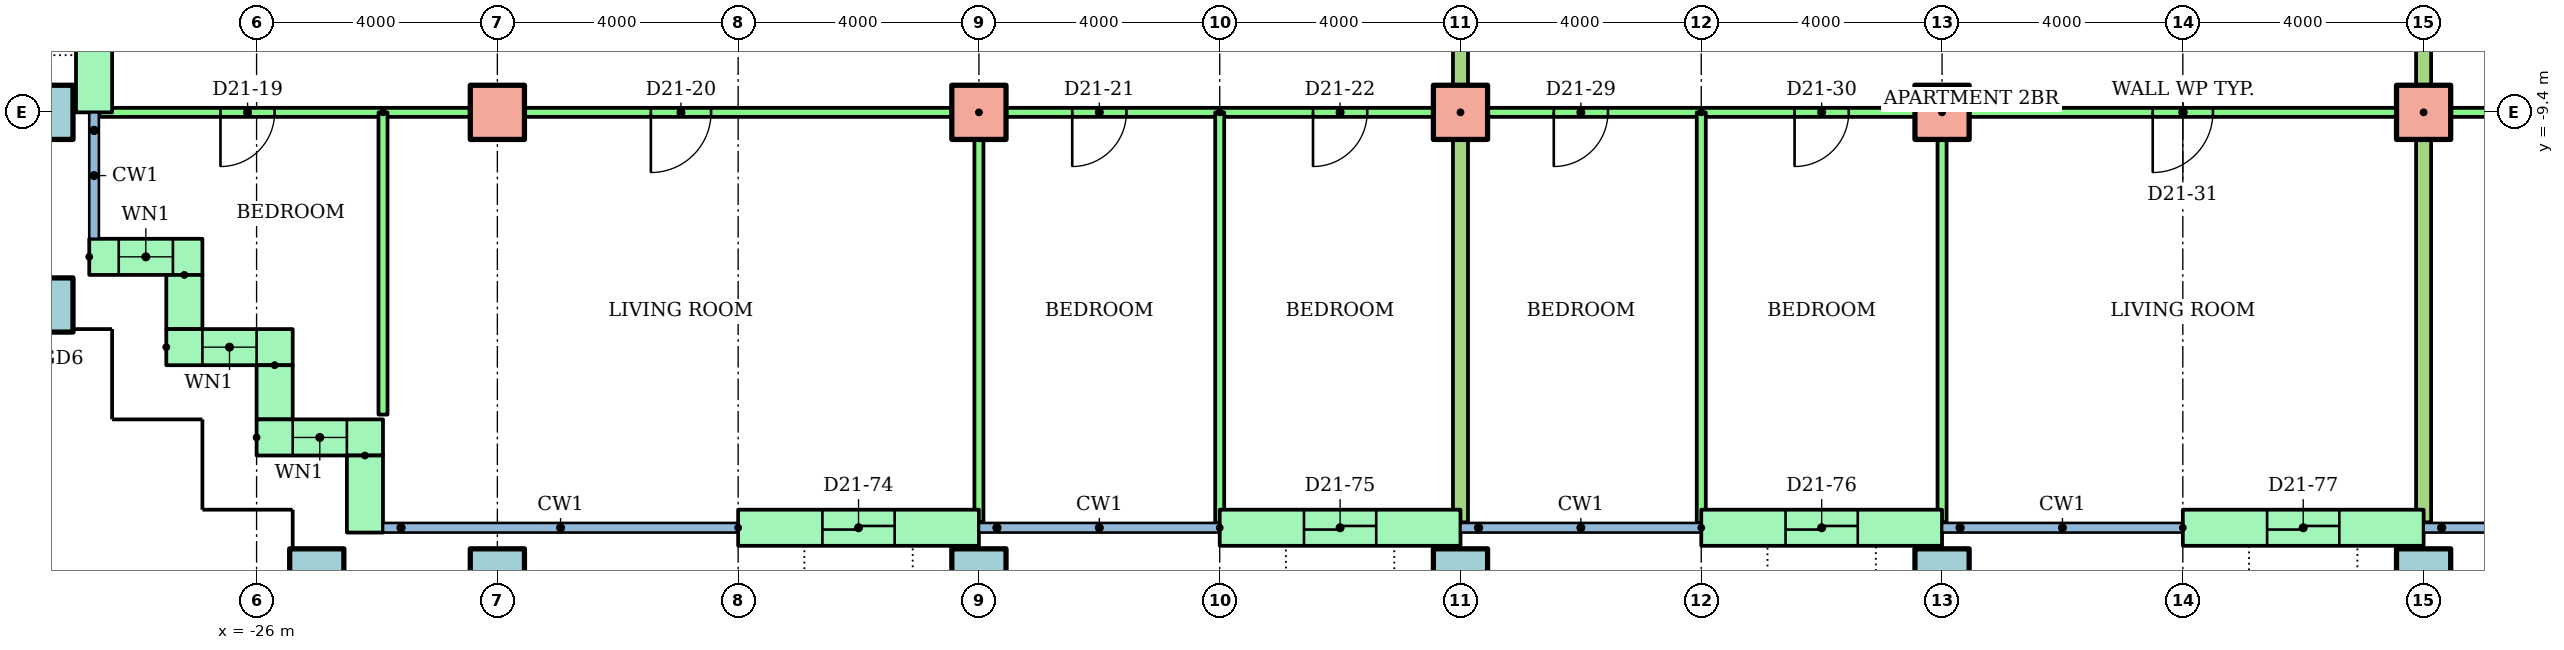
"""IFC4 building model, lengths in metres.
Left out: names, types, materials, properties, quantities, classifications, styles, units other than length and angle.
Written with IfcOpenShell. Run it as: python <this file> out.ifc"""

import sys

from ifc_helpers import new_model, si_unit, direction, frame, frame_2d, origin, origin_2d, place, context, subcontext, project, spatial, rectangle, hollow_rectangle, extrude, element, fill, save


model = new_model("IFC4")
c1 = context("Model", 3, precision=1e-05, world=origin(), true_north=direction((0.0, 1.0)))
c2 = subcontext(c1, "Body", "Model", "MODEL_VIEW")
j1 = project(units=[si_unit("LENGTHUNIT", "METRE"), si_unit("PLANEANGLEUNIT", "RADIAN")], contexts=[c1])
p1 = place(None, origin())
s1 = spatial("IfcSite", under=j1, at=p1, CompositionType="ELEMENT")
p2 = place(p1, origin())
s2 = spatial("IfcBuilding", under=s1, at=p2, CompositionType="ELEMENT")
p3 = place(p2, frame((0.0, 0.0, 83.9)))
s3 = spatial("IfcBuildingStorey", under=s2, at=p3, CompositionType="ELEMENT", Elevation=83.9)
for number, where in (
    (1, (-25.0, -17.1, 0.0)),
    (2, (-22.0, -17.1, 0.0)),
    (3, (-14.0, -17.1, 0.0)),
    (4, (-6.0, -17.1, 0.0)),
    (5, (2.0, -17.1, 0.0)),
    (6, (10.0, -17.1, 0.0)),
    (7, (-29.5, -12.6, 0.0)),
    (8, (-29.5, -9.4, 0.0)),
):
    element("IfcColumn", number, at=place(p3, frame(where)), inside=s3, PredefinedType="COLUMN", context=c2, shape_type="SweptSolid", body=[
        extrude(hollow_rectangle(XDim=0.9, YDim=0.9, WallThickness=0.045, at=origin_2d()), origin(), (0.0, 0.0, 1.0), 3.2),
    ])
for number, where in (
    (9, (-22.0, -9.4, 0.0)),
    (10, (-14.0, -9.4, 0.0)),
    (11, (-6.0, -9.4, 0.0)),
    (12, (2.0, -9.4, 0.0)),
    (13, (10.0, -9.4, 0.0)),
):
    element("IfcColumn", number, at=place(p3, frame(where)), inside=s3, PredefinedType="COLUMN", context=c2, shape_type="SweptSolid", body=[
        extrude(rectangle(XDim=0.9, YDim=0.9, at=origin_2d()), origin(), (0.0, 0.0, 1.0), 3.2),
    ])
p4 = place(p3, frame((-28.7, -5.7, 0.0), z_axis=(0.0, 0.0, 1.0), x_axis=(0.0, -1.0, 0.0)))
e14 = element("IfcWall", 14, at=p4, inside=s3, PredefinedType="STANDARD", context=c2, shape_type="SweptSolid", body=[
    extrude(rectangle(XDim=3.7, YDim=0.6, at=frame_2d((1.85, 0.0))), origin(), (0.0, 0.0, 1.0), 2.92),
])
p5 = place(p4, frame((0.825, 0.0, 0.0)))
e15 = element("IfcOpeningElement", 15, at=p5, cuts=e14, PredefinedType="OPENING", context=c2, shape_type="SweptSolid", body=[
    extrude(rectangle(XDim=1.2, YDim=2.1, at=frame_2d((0.6, 1.05))), frame((0.0, 0.31, 0.0), z_axis=(0.0, -1.0, 0.0), x_axis=(1.0, 0.0, 0.0)), (0.0, 0.0, 1.0), 0.62),
])
p6 = place(p3, frame((-28.78, -11.8, 0.0)))
e16 = element("IfcWall", 16, at=p6, inside=s3, PredefinedType="STANDARD", context=c2, shape_type="SweptSolid", body=[
    extrude(rectangle(XDim=1.88, YDim=0.6, at=frame_2d((0.94, 0.0))), origin(), (0.0, 0.0, 1.0), 2.92),
])
p7 = place(p6, frame((0.49, 0.0, 0.9)))
e17 = element("IfcOpeningElement", 17, at=p7, cuts=e16, PredefinedType="OPENING", context=c2, shape_type="SweptSolid", body=[
    extrude(rectangle(XDim=0.9, YDim=1.5, at=frame_2d((0.45, 0.75))), frame((0.0, 0.31, 0.0), z_axis=(0.0, -1.0, 0.0), x_axis=(1.0, 0.0, 0.0)), (0.0, 0.0, 1.0), 0.62),
])
p8 = place(p3, frame((-27.2, -12.1, 0.0), z_axis=(0.0, 0.0, 1.0), x_axis=(0.0, -1.0, 0.0)))
e18 = element("IfcWall", 18, at=p8, inside=s3, PredefinedType="STANDARD", context=c2, shape_type="SweptSolid", body=[
    extrude(rectangle(XDim=0.9, YDim=0.6, at=frame_2d((0.45, 0.0))), origin(), (0.0, 0.0, 1.0), 2.92),
])
p9 = place(p3, frame((-27.5, -13.3, 0.0)))
e19 = element("IfcWall", 19, at=p9, inside=s3, PredefinedType="STANDARD", context=c2, shape_type="SweptSolid", body=[
    extrude(rectangle(XDim=2.1, YDim=0.6, at=frame_2d((1.05, 0.0))), origin(), (0.0, 0.0, 1.0), 2.92),
])
p10 = place(p9, frame((0.6, 0.0, 0.9)))
e20 = element("IfcOpeningElement", 20, at=p10, cuts=e19, PredefinedType="OPENING", context=c2, shape_type="SweptSolid", body=[
    extrude(rectangle(XDim=0.9, YDim=1.5, at=frame_2d((0.45, 0.75))), frame((0.0, 0.31, 0.0), z_axis=(0.0, -1.0, 0.0), x_axis=(1.0, 0.0, 0.0)), (0.0, 0.0, 1.0), 0.62),
])
p11 = place(p3, frame((-25.7, -13.6, 0.0), z_axis=(0.0, 0.0, 1.0), x_axis=(0.0, -1.0, 0.0)))
e21 = element("IfcWall", 21, at=p11, inside=s3, PredefinedType="STANDARD", context=c2, shape_type="SweptSolid", body=[
    extrude(rectangle(XDim=0.9, YDim=0.6, at=frame_2d((0.45, 0.0))), origin(), (0.0, 0.0, 1.0), 2.92),
])
p12 = place(p3, frame((-26.0, -14.8, 0.0)))
e22 = element("IfcWall", 22, at=p12, inside=s3, PredefinedType="STANDARD", context=c2, shape_type="SweptSolid", body=[
    extrude(rectangle(XDim=2.1, YDim=0.6, at=frame_2d((1.05, 0.0))), origin(), (0.0, 0.0, 1.0), 2.92),
])
p13 = place(p12, frame((0.6, 0.0, 0.9)))
e23 = element("IfcOpeningElement", 23, at=p13, cuts=e22, PredefinedType="OPENING", context=c2, shape_type="SweptSolid", body=[
    extrude(rectangle(XDim=0.9, YDim=1.5, at=frame_2d((0.45, 0.75))), frame((0.0, 0.31, 0.0), z_axis=(0.0, -1.0, 0.0), x_axis=(1.0, 0.0, 0.0)), (0.0, 0.0, 1.0), 0.62),
])
p14 = place(p3, frame((-24.2, -15.1, 0.0), z_axis=(0.0, 0.0, 1.0), x_axis=(0.0, -1.0, 0.0)))
e24 = element("IfcWall", 24, at=p14, inside=s3, PredefinedType="STANDARD", context=c2, shape_type="SweptSolid", body=[
    extrude(rectangle(XDim=1.28, YDim=0.6, at=frame_2d((0.64, 0.0))), origin(), (0.0, 0.0, 1.0), 2.92),
])
p15 = place(p3, frame((-18.0, -16.3, 0.0)))
e25 = element("IfcWall", 25, at=p15, inside=s3, PredefinedType="STANDARD", context=c2, shape_type="SweptSolid", body=[
    extrude(rectangle(XDim=4.0, YDim=0.6, at=frame_2d((2.0, 0.0))), origin(), (0.0, 0.0, 1.0), 2.92),
])
p16 = place(p15, frame((1.4, 0.0, 0.0)))
e26 = element("IfcOpeningElement", 26, at=p16, cuts=e25, PredefinedType="OPENING", context=c2, shape_type="SweptSolid", body=[
    extrude(rectangle(XDim=1.2, YDim=2.1, at=frame_2d((0.6, 1.05))), frame((0.0, 0.31, 0.0), z_axis=(0.0, -1.0, 0.0), x_axis=(1.0, 0.0, 0.0)), (0.0, 0.0, 1.0), 0.62),
])
p17 = place(p3, frame((-10.0, -16.3, 0.0)))
e27 = element("IfcWall", 27, at=p17, inside=s3, PredefinedType="STANDARD", context=c2, shape_type="SweptSolid", body=[
    extrude(rectangle(XDim=4.0, YDim=0.6, at=frame_2d((2.0, 0.0))), origin(), (0.0, 0.0, 1.0), 2.92),
])
p18 = place(p17, frame((1.4, 0.0, 0.0)))
e28 = element("IfcOpeningElement", 28, at=p18, cuts=e27, PredefinedType="OPENING", context=c2, shape_type="SweptSolid", body=[
    extrude(rectangle(XDim=1.2, YDim=2.1, at=frame_2d((0.6, 1.05))), frame((0.0, 0.31, 0.0), z_axis=(0.0, -1.0, 0.0), x_axis=(1.0, 0.0, 0.0)), (0.0, 0.0, 1.0), 0.62),
])
p19 = place(p3, frame((-2.0, -16.3, 0.0)))
e29 = element("IfcWall", 29, at=p19, inside=s3, PredefinedType="STANDARD", context=c2, shape_type="SweptSolid", body=[
    extrude(rectangle(XDim=4.0, YDim=0.6, at=frame_2d((2.0, 0.0))), origin(), (0.0, 0.0, 1.0), 2.92),
])
p20 = place(p19, frame((1.4, 0.0, 0.0)))
e30 = element("IfcOpeningElement", 30, at=p20, cuts=e29, PredefinedType="OPENING", context=c2, shape_type="SweptSolid", body=[
    extrude(rectangle(XDim=1.2, YDim=2.1, at=frame_2d((0.6, 1.05))), frame((0.0, 0.31, 0.0), z_axis=(0.0, -1.0, 0.0), x_axis=(1.0, 0.0, 0.0)), (0.0, 0.0, 1.0), 0.62),
])
p21 = place(p3, frame((6.0, -16.3, 0.0)))
e31 = element("IfcWall", 31, at=p21, inside=s3, PredefinedType="STANDARD", context=c2, shape_type="SweptSolid", body=[
    extrude(rectangle(XDim=4.0, YDim=0.6, at=frame_2d((2.0, 0.0))), origin(), (0.0, 0.0, 1.0), 2.92),
])
p22 = place(p21, frame((1.4, 0.0, 0.0)))
e32 = element("IfcOpeningElement", 32, at=p22, cuts=e31, PredefinedType="OPENING", context=c2, shape_type="SweptSolid", body=[
    extrude(rectangle(XDim=1.2, YDim=2.1, at=frame_2d((0.6, 1.05))), frame((0.0, 0.31, 0.0), z_axis=(0.0, -1.0, 0.0), x_axis=(1.0, 0.0, 0.0)), (0.0, 0.0, 1.0), 0.62),
])
p23 = place(p3, frame((-6.0, -9.4, 0.0), z_axis=(0.0, 0.0, 1.0), x_axis=(-1.0, 0.0, 0.0)))
e33 = element("IfcWall", 33, at=p23, inside=s3, PredefinedType="PARTITIONING", context=c2, shape_type="SweptSolid", body=[
    extrude(rectangle(XDim=22.61, YDim=0.15, at=frame_2d((11.305, 0.0))), origin(), (0.0, 0.0, 1.0), 2.4),
])
p24 = place(p23, frame((19.7, 0.0, 0.0)))
e34 = element("IfcOpeningElement", 34, at=p24, cuts=e33, PredefinedType="OPENING", context=c2, shape_type="SweptSolid", body=[
    extrude(rectangle(XDim=0.9, YDim=2.1, at=frame_2d((0.45, 1.05))), frame((0.0, 0.085, 0.0), z_axis=(0.0, -1.0, 0.0), x_axis=(1.0, 0.0, 0.0)), (0.0, 0.0, 1.0), 0.17),
])
p25 = place(p23, frame((12.45, 0.0, 0.0)))
e35 = element("IfcOpeningElement", 35, at=p25, cuts=e33, PredefinedType="OPENING", context=c2, shape_type="SweptSolid", body=[
    extrude(rectangle(XDim=1.0, YDim=2.1, at=frame_2d((0.5, 1.05))), frame((0.0, 0.085, 0.0), z_axis=(0.0, -1.0, 0.0), x_axis=(1.0, 0.0, 0.0)), (0.0, 0.0, 1.0), 0.17),
])
p26 = place(p23, frame((5.55, 0.0, 0.0)))
e36 = element("IfcOpeningElement", 36, at=p26, cuts=e33, PredefinedType="OPENING", context=c2, shape_type="SweptSolid", body=[
    extrude(rectangle(XDim=0.9, YDim=2.1, at=frame_2d((0.45, 1.05))), frame((0.0, 0.085, 0.0), z_axis=(0.0, -1.0, 0.0), x_axis=(1.0, 0.0, 0.0)), (0.0, 0.0, 1.0), 0.17),
])
p27 = place(p23, frame((1.55, 0.0, 0.0)))
e37 = element("IfcOpeningElement", 37, at=p27, cuts=e33, PredefinedType="OPENING", context=c2, shape_type="SweptSolid", body=[
    extrude(rectangle(XDim=0.9, YDim=2.1, at=frame_2d((0.45, 1.05))), frame((0.0, 0.085, 0.0), z_axis=(0.0, -1.0, 0.0), x_axis=(1.0, 0.0, 0.0)), (0.0, 0.0, 1.0), 0.17),
])
p28 = place(p3, frame((-23.9, -9.4, 0.0), z_axis=(0.0, 0.0, 1.0), x_axis=(0.0, -1.0, 0.0)))
e38 = element("IfcWall", 38, at=p28, inside=s3, PredefinedType="PARTITIONING", context=c2, shape_type="SweptSolid", body=[
    extrude(rectangle(XDim=5.02, YDim=0.15, at=frame_2d((2.51, 0.0))), origin(), (0.0, 0.0, 1.0), 2.4),
])
p29 = place(p3, frame((-14.0, -9.4, 0.0), z_axis=(0.0, 0.0, 1.0), x_axis=(0.0, -1.0, 0.0)))
e39 = element("IfcWall", 39, at=p29, inside=s3, PredefinedType="PARTITIONING", context=c2, shape_type="SweptSolid", body=[
    extrude(rectangle(XDim=6.81, YDim=0.15, at=frame_2d((3.405, 0.0))), origin(), (0.0, 0.0, 1.0), 2.4),
])
p30 = place(p3, frame((-10.0, -9.4, 0.0), z_axis=(0.0, 0.0, 1.0), x_axis=(0.0, -1.0, 0.0)))
e40 = element("IfcWall", 40, at=p30, inside=s3, PredefinedType="PARTITIONING", context=c2, shape_type="SweptSolid", body=[
    extrude(rectangle(XDim=6.821, YDim=0.15, at=frame_2d((3.411, 0.0))), origin(), (0.0, 0.0, 1.0), 2.4),
])
p31 = place(p3, frame((10.0, -9.4, 0.0), z_axis=(0.0, 0.0, 1.0), x_axis=(-1.0, 0.0, 0.0)))
e41 = element("IfcWall", 41, at=p31, inside=s3, PredefinedType="PARTITIONING", context=c2, shape_type="SweptSolid", body=[
    extrude(rectangle(XDim=16.0, YDim=0.15, at=frame_2d((8.0, 0.0))), origin(), (0.0, 0.0, 1.0), 2.4),
])
p32 = place(p31, frame((13.55, 0.0, 0.0)))
e42 = element("IfcOpeningElement", 42, at=p32, cuts=e41, PredefinedType="OPENING", context=c2, shape_type="SweptSolid", body=[
    extrude(rectangle(XDim=0.9, YDim=2.1, at=frame_2d((0.45, 1.05))), frame((0.0, 0.085, 0.0), z_axis=(0.0, -1.0, 0.0), x_axis=(1.0, 0.0, 0.0)), (0.0, 0.0, 1.0), 0.17),
])
p33 = place(p31, frame((9.55, 0.0, 0.0)))
e43 = element("IfcOpeningElement", 43, at=p33, cuts=e41, PredefinedType="OPENING", context=c2, shape_type="SweptSolid", body=[
    extrude(rectangle(XDim=0.9, YDim=2.1, at=frame_2d((0.45, 1.05))), frame((0.0, 0.085, 0.0), z_axis=(0.0, -1.0, 0.0), x_axis=(1.0, 0.0, 0.0)), (0.0, 0.0, 1.0), 0.17),
])
p34 = place(p31, frame((3.5, 0.0, 0.0)))
e44 = element("IfcOpeningElement", 44, at=p34, cuts=e41, PredefinedType="OPENING", context=c2, shape_type="SweptSolid", body=[
    extrude(rectangle(XDim=1.0, YDim=2.1, at=frame_2d((0.5, 1.05))), frame((0.0, 0.085, 0.0), z_axis=(0.0, -1.0, 0.0), x_axis=(1.0, 0.0, 0.0)), (0.0, 0.0, 1.0), 0.17),
])
p35 = place(p3, frame((-2.0, -9.4, 0.0), z_axis=(0.0, 0.0, 1.0), x_axis=(0.0, -1.0, 0.0)))
e45 = element("IfcWall", 45, at=p35, inside=s3, PredefinedType="PARTITIONING", context=c2, shape_type="SweptSolid", body=[
    extrude(rectangle(XDim=6.821, YDim=0.15, at=frame_2d((3.411, 0.0))), origin(), (0.0, 0.0, 1.0), 2.4),
])
p36 = place(p3, frame((2.0, -9.4, 0.0), z_axis=(0.0, 0.0, 1.0), x_axis=(0.0, -1.0, 0.0)))
e46 = element("IfcWall", 46, at=p36, inside=s3, PredefinedType="PARTITIONING", context=c2, shape_type="SweptSolid", body=[
    extrude(rectangle(XDim=6.81, YDim=0.15, at=frame_2d((3.405, 0.0))), origin(), (0.0, 0.0, 1.0), 2.4),
])
p37 = place(p3, frame((-6.0, -1.4, 0.0), z_axis=(0.0, 0.0, 1.0), x_axis=(0.0, -1.0, 0.0)))
e47 = element("IfcWall", 47, at=p37, inside=s3, PredefinedType="PARTITIONING", context=c2, shape_type="SweptSolid", body=[
    extrude(rectangle(XDim=14.81, YDim=0.25, at=frame_2d((7.405, 0.0))), origin(), (0.0, 0.0, 1.0), 2.4),
])
p38 = place(p3, frame((26.0, -9.4, 0.0), z_axis=(0.0, 0.0, 1.0), x_axis=(-1.0, 0.0, 0.0)))
e48 = element("IfcWall", 48, at=p38, inside=s3, PredefinedType="PARTITIONING", context=c2, shape_type="SweptSolid", body=[
    extrude(rectangle(XDim=16.0, YDim=0.15, at=frame_2d((8.0, 0.0))), origin(), (0.0, 0.0, 1.0), 2.4),
])
p39 = place(p38, frame((13.55, 0.0, 0.0)))
e49 = element("IfcOpeningElement", 49, at=p39, cuts=e48, PredefinedType="OPENING", context=c2, shape_type="SweptSolid", body=[
    extrude(rectangle(XDim=0.9, YDim=2.1, at=frame_2d((0.45, 1.05))), frame((0.0, 0.085, 0.0), z_axis=(0.0, -1.0, 0.0), x_axis=(1.0, 0.0, 0.0)), (0.0, 0.0, 1.0), 0.17),
])
p40 = place(p38, frame((9.55, 0.0, 0.0)))
e50 = element("IfcOpeningElement", 50, at=p40, cuts=e48, PredefinedType="OPENING", context=c2, shape_type="SweptSolid", body=[
    extrude(rectangle(XDim=0.9, YDim=2.1, at=frame_2d((0.45, 1.05))), frame((0.0, 0.085, 0.0), z_axis=(0.0, -1.0, 0.0), x_axis=(1.0, 0.0, 0.0)), (0.0, 0.0, 1.0), 0.17),
])
p41 = place(p38, frame((5.55, 0.0, 0.0)))
e51 = element("IfcOpeningElement", 51, at=p41, cuts=e48, PredefinedType="OPENING", context=c2, shape_type="SweptSolid", body=[
    extrude(rectangle(XDim=0.9, YDim=2.1, at=frame_2d((0.45, 1.05))), frame((0.0, 0.085, 0.0), z_axis=(0.0, -1.0, 0.0), x_axis=(1.0, 0.0, 0.0)), (0.0, 0.0, 1.0), 0.17),
])
p42 = place(p38, frame((1.5, 0.0, 0.0)))
e52 = element("IfcOpeningElement", 52, at=p42, cuts=e48, PredefinedType="OPENING", context=c2, shape_type="SweptSolid", body=[
    extrude(rectangle(XDim=1.0, YDim=2.1, at=frame_2d((0.5, 1.05))), frame((0.0, 0.085, 0.0), z_axis=(0.0, -1.0, 0.0), x_axis=(1.0, 0.0, 0.0)), (0.0, 0.0, 1.0), 0.17),
])
p43 = place(p3, frame((10.0, -1.4, 0.0), z_axis=(0.0, 0.0, 1.0), x_axis=(0.0, -1.0, 0.0)))
e53 = element("IfcWall", 53, at=p43, inside=s3, PredefinedType="PARTITIONING", context=c2, shape_type="SweptSolid", body=[
    extrude(rectangle(XDim=14.81, YDim=0.25, at=frame_2d((7.405, 0.0))), origin(), (0.0, 0.0, 1.0), 2.4),
])
p44 = place(p7, origin())
e54 = element("IfcWindow", 54, at=p44, inside=s3, PartitioningType="SINGLE_PANEL", PredefinedType="WINDOW", context=c2, shape_type="SweptSolid", body=[
    extrude(rectangle(XDim=0.9, YDim=1.5, at=frame_2d((0.45, 0.75))), frame((0.0, 0.03, 0.0), z_axis=(0.0, -1.0, 0.0), x_axis=(1.0, 0.0, 0.0)), (0.0, 0.0, 1.0), 0.06),
])
fill(e17, e54)
p45 = place(p10, origin())
e55 = element("IfcWindow", 55, at=p45, inside=s3, PartitioningType="SINGLE_PANEL", PredefinedType="WINDOW", context=c2, shape_type="SweptSolid", body=[
    extrude(rectangle(XDim=0.9, YDim=1.5, at=frame_2d((0.45, 0.75))), frame((0.0, 0.03, 0.0), z_axis=(0.0, -1.0, 0.0), x_axis=(1.0, 0.0, 0.0)), (0.0, 0.0, 1.0), 0.06),
])
fill(e20, e55)
p46 = place(p13, origin())
e56 = element("IfcWindow", 56, at=p46, inside=s3, PartitioningType="SINGLE_PANEL", PredefinedType="WINDOW", context=c2, shape_type="SweptSolid", body=[
    extrude(rectangle(XDim=0.9, YDim=1.5, at=frame_2d((0.45, 0.75))), frame((0.0, 0.03, 0.0), z_axis=(0.0, -1.0, 0.0), x_axis=(1.0, 0.0, 0.0)), (0.0, 0.0, 1.0), 0.06),
])
fill(e23, e56)
p47 = place(p24, origin())
e57 = element("IfcDoor", 57, at=p47, inside=s3, OperationType="SINGLE_SWING_RIGHT", PredefinedType="DOOR", context=c2, shape_type="SweptSolid", body=[
    extrude(rectangle(XDim=0.9, YDim=2.1, at=frame_2d((0.45, 1.05))), frame((0.0, 0.025, 0.0), z_axis=(0.0, -1.0, 0.0), x_axis=(1.0, 0.0, 0.0)), (0.0, 0.0, 1.0), 0.05),
])
fill(e34, e57)
p48 = place(p25, origin())
e58 = element("IfcDoor", 58, at=p48, inside=s3, OperationType="SINGLE_SWING_RIGHT", PredefinedType="DOOR", context=c2, shape_type="SweptSolid", body=[
    extrude(rectangle(XDim=1.0, YDim=2.1, at=frame_2d((0.5, 1.05))), frame((0.0, 0.025, 0.0), z_axis=(0.0, -1.0, 0.0), x_axis=(1.0, 0.0, 0.0)), (0.0, 0.0, 1.0), 0.05),
])
fill(e35, e58)
p49 = place(p26, origin())
e59 = element("IfcDoor", 59, at=p49, inside=s3, OperationType="SINGLE_SWING_RIGHT", PredefinedType="DOOR", context=c2, shape_type="SweptSolid", body=[
    extrude(rectangle(XDim=0.9, YDim=2.1, at=frame_2d((0.45, 1.05))), frame((0.0, 0.025, 0.0), z_axis=(0.0, -1.0, 0.0), x_axis=(1.0, 0.0, 0.0)), (0.0, 0.0, 1.0), 0.05),
])
fill(e36, e59)
p50 = place(p27, origin())
e60 = element("IfcDoor", 60, at=p50, inside=s3, OperationType="SINGLE_SWING_RIGHT", PredefinedType="DOOR", context=c2, shape_type="SweptSolid", body=[
    extrude(rectangle(XDim=0.9, YDim=2.1, at=frame_2d((0.45, 1.05))), frame((0.0, 0.025, 0.0), z_axis=(0.0, -1.0, 0.0), x_axis=(1.0, 0.0, 0.0)), (0.0, 0.0, 1.0), 0.05),
])
fill(e37, e60)
p51 = place(p32, origin())
e61 = element("IfcDoor", 61, at=p51, inside=s3, OperationType="SINGLE_SWING_RIGHT", PredefinedType="DOOR", context=c2, shape_type="SweptSolid", body=[
    extrude(rectangle(XDim=0.9, YDim=2.1, at=frame_2d((0.45, 1.05))), frame((0.0, 0.025, 0.0), z_axis=(0.0, -1.0, 0.0), x_axis=(1.0, 0.0, 0.0)), (0.0, 0.0, 1.0), 0.05),
])
fill(e42, e61)
p52 = place(p33, origin())
e62 = element("IfcDoor", 62, at=p52, inside=s3, OperationType="SINGLE_SWING_RIGHT", PredefinedType="DOOR", context=c2, shape_type="SweptSolid", body=[
    extrude(rectangle(XDim=0.9, YDim=2.1, at=frame_2d((0.45, 1.05))), frame((0.0, 0.025, 0.0), z_axis=(0.0, -1.0, 0.0), x_axis=(1.0, 0.0, 0.0)), (0.0, 0.0, 1.0), 0.05),
])
fill(e43, e62)
p53 = place(p34, origin())
e63 = element("IfcDoor", 63, at=p53, inside=s3, OperationType="SINGLE_SWING_RIGHT", PredefinedType="DOOR", context=c2, shape_type="SweptSolid", body=[
    extrude(rectangle(XDim=1.0, YDim=2.1, at=frame_2d((0.5, 1.05))), frame((0.0, 0.025, 0.0), z_axis=(0.0, -1.0, 0.0), x_axis=(1.0, 0.0, 0.0)), (0.0, 0.0, 1.0), 0.05),
])
fill(e44, e63)
p54 = place(p16, origin())
e64 = element("IfcDoor", 64, at=p54, inside=s3, OperationType="SLIDING_TO_LEFT", PredefinedType="DOOR", context=c2, shape_type="SweptSolid", body=[
    extrude(rectangle(XDim=1.2, YDim=2.1, at=frame_2d((0.6, 1.05))), frame((0.0, 0.025, 0.0), z_axis=(0.0, -1.0, 0.0), x_axis=(1.0, 0.0, 0.0)), (0.0, 0.0, 1.0), 0.05),
])
fill(e26, e64)
p55 = place(p18, origin())
e65 = element("IfcDoor", 65, at=p55, inside=s3, OperationType="SLIDING_TO_LEFT", PredefinedType="DOOR", context=c2, shape_type="SweptSolid", body=[
    extrude(rectangle(XDim=1.2, YDim=2.1, at=frame_2d((0.6, 1.05))), frame((0.0, 0.025, 0.0), z_axis=(0.0, -1.0, 0.0), x_axis=(1.0, 0.0, 0.0)), (0.0, 0.0, 1.0), 0.05),
])
fill(e28, e65)
p56 = place(p20, origin())
e66 = element("IfcDoor", 66, at=p56, inside=s3, OperationType="SLIDING_TO_LEFT", PredefinedType="DOOR", context=c2, shape_type="SweptSolid", body=[
    extrude(rectangle(XDim=1.2, YDim=2.1, at=frame_2d((0.6, 1.05))), frame((0.0, 0.025, 0.0), z_axis=(0.0, -1.0, 0.0), x_axis=(1.0, 0.0, 0.0)), (0.0, 0.0, 1.0), 0.05),
])
fill(e30, e66)
p57 = place(p22, origin())
e67 = element("IfcDoor", 67, at=p57, inside=s3, OperationType="SLIDING_TO_LEFT", PredefinedType="DOOR", context=c2, shape_type="SweptSolid", body=[
    extrude(rectangle(XDim=1.2, YDim=2.1, at=frame_2d((0.6, 1.05))), frame((0.0, 0.025, 0.0), z_axis=(0.0, -1.0, 0.0), x_axis=(1.0, 0.0, 0.0)), (0.0, 0.0, 1.0), 0.05),
])
fill(e32, e67)
save(model, sys.argv[1])
